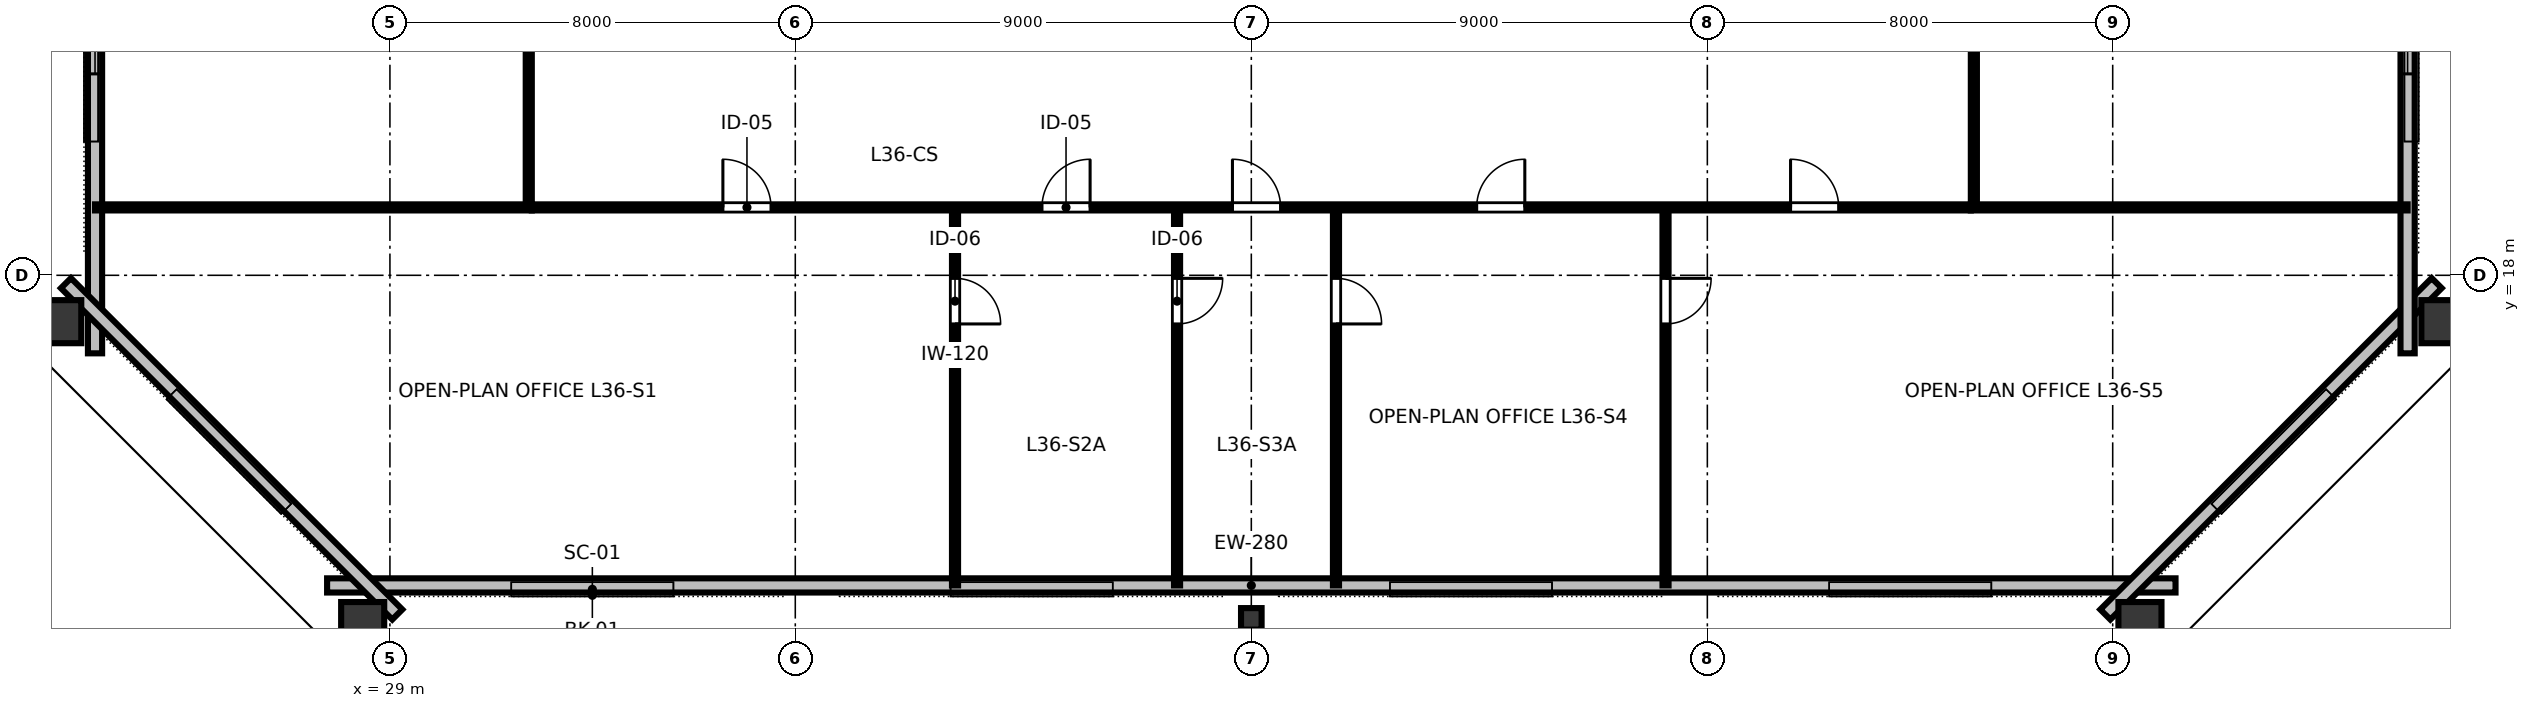
"""IFC4 building model, lengths in metres.
Left out: names, types, materials, properties, quantities, classifications, styles, units other than length and angle.
Written with IfcOpenShell. Run it as: python <this file> out.ifc"""

import sys

from ifc_helpers import new_model, si_unit, direction, frame, frame_2d, origin, origin_2d, place, context, subcontext, project, spatial, rectangle, hollow_rectangle, i_section, extrude, element, fill, save


model = new_model("IFC4")
c1 = context("Model", 3, precision=1e-05, world=origin(), true_north=direction((0.0, 1.0)))
c2 = subcontext(c1, "Body", "Model", "MODEL_VIEW")
j1 = project(units=[si_unit("LENGTHUNIT", "METRE"), si_unit("PLANEANGLEUNIT", "RADIAN")], contexts=[c1])
p1 = place(None, origin())
s1 = spatial("IfcSite", under=j1, at=p1, CompositionType="ELEMENT")
p2 = place(p1, origin())
s2 = spatial("IfcBuilding", under=s1, at=p2, CompositionType="ELEMENT")
p3 = place(p2, frame((0.0, 0.0, 138.4)))
s3 = spatial("IfcBuildingStorey", under=s2, at=p3, CompositionType="ELEMENT", Elevation=138.4)
p4 = place(p3, frame((28.462, 11.052, 0.0), z_axis=(0.0, 0.0, 1.0), x_axis=(1.0, 0.0, 0.0)))
e1 = element("IfcColumn", 1, at=p4, inside=s3, PredefinedType="COLUMN", context=c2, shape_type="SweptSolid", body=[
    extrude(hollow_rectangle(XDim=0.85, YDim=1.0, WallThickness=0.05, at=origin_2d()), origin(), (0.0, 0.0, 1.0), 3.358),
])
p5 = place(p3, frame((46.0, 11.22, 0.0), z_axis=(0.0, 0.0, 1.0), x_axis=(1.0, 0.0, 0.0)))
e2 = element("IfcColumn", 2, at=p5, inside=s3, PredefinedType="COLUMN", context=c2, shape_type="SweptSolid", body=[
    extrude(i_section(OverallWidth=0.406, OverallDepth=0.425, WebThickness=0.033, FlangeThickness=0.052, FilletRadius=0.025, at=origin_2d()), origin(), (0.0, 0.0, 1.0), 3.358),
])
for number, where, z_axis, x_axis in (
    (3, (63.538, 11.052, 0.0), (0.0, 0.0, 1.0), (1.0, 0.0, 0.0)),
    (4, (69.591, 17.085, 0.0), (0.0, 0.0, 1.0), (0.0, 1.0, 0.0)),
    (5, (22.409, 17.085, 0.0), (0.0, 0.0, 1.0), (0.0, 1.0, 0.0)),
):
    element("IfcColumn", number, at=place(p3, frame(where, z_axis=z_axis, x_axis=x_axis)), inside=s3, PredefinedType="COLUMN", context=c2, shape_type="SweptSolid", body=[
        extrude(hollow_rectangle(XDim=0.85, YDim=1.0, WallThickness=0.05, at=origin_2d()), origin(), (0.0, 0.0, 1.0), 3.358),
    ])
p6 = place(p3, frame((27.76, 11.88, 0.0), z_axis=(0.0, 0.0, 1.0), x_axis=(1.0, 0.0, 0.0)))
e6 = element("IfcWall", 6, at=p6, inside=s3, PredefinedType="STANDARD", context=c2, shape_type="SweptSolid", body=[
    extrude(rectangle(XDim=36.48, YDim=0.28, at=frame_2d((18.24, 0.0))), origin(), (0.0, 0.0, 1.0), 3.36),
])
p7 = place(p3, frame((62.854, 11.306, 0.0), z_axis=(0.0, 0.0, 1.0), x_axis=(0.707106781187, 0.707106781187, 0.0)))
e7 = element("IfcWall", 7, at=p7, inside=s3, PredefinedType="STANDARD", context=c2, shape_type="SweptSolid", body=[
    extrude(rectangle(XDim=9.248, YDim=0.28, at=frame_2d((4.624, 0.0))), origin(), (0.0, 0.0, 1.0), 3.36),
])
p8 = place(p3, frame((68.82, 16.46, 0.0), z_axis=(0.0, 0.0, 1.0), x_axis=(0.0, 1.0, 0.0)))
e8 = element("IfcWall", 8, at=p8, inside=s3, PredefinedType="STANDARD", context=c2, shape_type="SweptSolid", body=[
    extrude(rectangle(XDim=31.08, YDim=0.28, at=frame_2d((15.54, 0.0))), origin(), (0.0, 0.0, 1.0), 3.36),
])
p9 = place(p8, frame((11.86, 0.0, 0.0)))
e9 = element("IfcOpeningElement", 9, at=p9, cuts=e8, PredefinedType="OPENING", context=c2, shape_type="SweptSolid", body=[
    extrude(rectangle(XDim=1.4, YDim=2.15, at=frame_2d((0.7, 1.075))), frame((0.0, 0.15, 0.0), z_axis=(0.0, -1.0, 0.0), x_axis=(1.0, 0.0, 0.0)), (0.0, 0.0, 1.0), 0.3),
])
p10 = place(p8, frame((5.515, 0.0, 0.8)))
e10 = element("IfcOpeningElement", 10, at=p10, cuts=e8, PredefinedType="OPENING", context=c2, shape_type="SweptSolid", body=[
    extrude(rectangle(XDim=2.0, YDim=1.95, at=frame_2d((1.0, 0.975))), frame((0.0, 0.15, 0.0), z_axis=(0.0, -1.0, 0.0), x_axis=(1.0, 0.0, 0.0)), (0.0, 0.0, 1.0), 0.3),
])
p11 = place(p8, frame((9.125, 0.0, 0.8)))
e11 = element("IfcOpeningElement", 11, at=p11, cuts=e8, PredefinedType="OPENING", context=c2, shape_type="SweptSolid", body=[
    extrude(rectangle(XDim=2.0, YDim=1.95, at=frame_2d((1.0, 0.975))), frame((0.0, 0.15, 0.0), z_axis=(0.0, -1.0, 0.0), x_axis=(1.0, 0.0, 0.0)), (0.0, 0.0, 1.0), 0.3),
])
p12 = place(p8, frame((19.955, 0.0, 0.8)))
e12 = element("IfcOpeningElement", 12, at=p12, cuts=e8, PredefinedType="OPENING", context=c2, shape_type="SweptSolid", body=[
    extrude(rectangle(XDim=2.0, YDim=1.95, at=frame_2d((1.0, 0.975))), frame((0.0, 0.15, 0.0), z_axis=(0.0, -1.0, 0.0), x_axis=(1.0, 0.0, 0.0)), (0.0, 0.0, 1.0), 0.3),
])
p13 = place(p8, frame((23.565, 0.0, 0.8)))
e13 = element("IfcOpeningElement", 13, at=p13, cuts=e8, PredefinedType="OPENING", context=c2, shape_type="SweptSolid", body=[
    extrude(rectangle(XDim=2.0, YDim=1.95, at=frame_2d((1.0, 0.975))), frame((0.0, 0.15, 0.0), z_axis=(0.0, -1.0, 0.0), x_axis=(1.0, 0.0, 0.0)), (0.0, 0.0, 1.0), 0.3),
])
p14 = place(p3, frame((23.18, 47.54, 0.0), z_axis=(0.0, 0.0, 1.0), x_axis=(0.0, -1.0, 0.0)))
e14 = element("IfcWall", 14, at=p14, inside=s3, PredefinedType="STANDARD", context=c2, shape_type="SweptSolid", body=[
    extrude(rectangle(XDim=31.08, YDim=0.28, at=frame_2d((15.54, 0.0))), origin(), (0.0, 0.0, 1.0), 3.36),
])
p15 = place(p14, frame((11.86, 0.0, 0.0)))
e15 = element("IfcOpeningElement", 15, at=p15, cuts=e14, PredefinedType="OPENING", context=c2, shape_type="SweptSolid", body=[
    extrude(rectangle(XDim=1.4, YDim=2.15, at=frame_2d((0.7, 1.075))), frame((0.0, 0.15, 0.0), z_axis=(0.0, -1.0, 0.0), x_axis=(1.0, 0.0, 0.0)), (0.0, 0.0, 1.0), 0.3),
])
p16 = place(p14, frame((5.515, 0.0, 0.8)))
e16 = element("IfcOpeningElement", 16, at=p16, cuts=e14, PredefinedType="OPENING", context=c2, shape_type="SweptSolid", body=[
    extrude(rectangle(XDim=2.0, YDim=1.95, at=frame_2d((1.0, 0.975))), frame((0.0, 0.15, 0.0), z_axis=(0.0, -1.0, 0.0), x_axis=(1.0, 0.0, 0.0)), (0.0, 0.0, 1.0), 0.3),
])
p17 = place(p14, frame((9.125, 0.0, 0.8)))
e17 = element("IfcOpeningElement", 17, at=p17, cuts=e14, PredefinedType="OPENING", context=c2, shape_type="SweptSolid", body=[
    extrude(rectangle(XDim=2.0, YDim=1.95, at=frame_2d((1.0, 0.975))), frame((0.0, 0.15, 0.0), z_axis=(0.0, -1.0, 0.0), x_axis=(1.0, 0.0, 0.0)), (0.0, 0.0, 1.0), 0.3),
])
p18 = place(p14, frame((19.955, 0.0, 0.8)))
e18 = element("IfcOpeningElement", 18, at=p18, cuts=e14, PredefinedType="OPENING", context=c2, shape_type="SweptSolid", body=[
    extrude(rectangle(XDim=2.0, YDim=1.95, at=frame_2d((1.0, 0.975))), frame((0.0, 0.15, 0.0), z_axis=(0.0, -1.0, 0.0), x_axis=(1.0, 0.0, 0.0)), (0.0, 0.0, 1.0), 0.3),
])
p19 = place(p14, frame((23.565, 0.0, 0.8)))
e19 = element("IfcOpeningElement", 19, at=p19, cuts=e14, PredefinedType="OPENING", context=c2, shape_type="SweptSolid", body=[
    extrude(rectangle(XDim=2.0, YDim=1.95, at=frame_2d((1.0, 0.975))), frame((0.0, 0.15, 0.0), z_axis=(0.0, -1.0, 0.0), x_axis=(1.0, 0.0, 0.0)), (0.0, 0.0, 1.0), 0.3),
])
p20 = place(p3, frame((22.606, 17.845, 0.0), z_axis=(0.0, 0.0, 1.0), x_axis=(0.707106781187, -0.707106781187, 0.0)))
e20 = element("IfcWall", 20, at=p20, inside=s3, PredefinedType="STANDARD", context=c2, shape_type="SweptSolid", body=[
    extrude(rectangle(XDim=9.248, YDim=0.28, at=frame_2d((4.624, 0.0))), origin(), (0.0, 0.0, 1.0), 3.36),
])
p21 = place(p3, frame((40.152, 19.34, 0.0), z_axis=(0.0, 0.0, 1.0), x_axis=(0.0, -1.0, 0.0)))
e21 = element("IfcWall", 21, at=p21, inside=s3, PredefinedType="PARTITIONING", context=c2, shape_type="SweptSolid", body=[
    extrude(rectangle(XDim=7.46, YDim=0.12, at=frame_2d((3.73, 0.0))), origin(), (0.0, 0.0, 1.0), 2.64),
])
p22 = place(p21, frame((1.4, 0.0, 0.0)))
e22 = element("IfcOpeningElement", 22, at=p22, cuts=e21, PredefinedType="OPENING", context=c2, shape_type="SweptSolid", body=[
    extrude(rectangle(XDim=0.9, YDim=2.15, at=frame_2d((0.45, 1.075))), frame((0.0, 0.07, 0.0), z_axis=(0.0, -1.0, 0.0), x_axis=(1.0, 0.0, 0.0)), (0.0, 0.0, 1.0), 0.14),
])
p23 = place(p3, frame((44.534, 19.34, 0.0), z_axis=(0.0, 0.0, 1.0), x_axis=(0.0, -1.0, 0.0)))
e23 = element("IfcWall", 23, at=p23, inside=s3, PredefinedType="PARTITIONING", context=c2, shape_type="SweptSolid", body=[
    extrude(rectangle(XDim=7.46, YDim=0.12, at=frame_2d((3.73, 0.0))), origin(), (0.0, 0.0, 1.0), 2.64),
])
p24 = place(p23, frame((1.4, 0.0, 0.0)))
e24 = element("IfcOpeningElement", 24, at=p24, cuts=e23, PredefinedType="OPENING", context=c2, shape_type="SweptSolid", body=[
    extrude(rectangle(XDim=0.9, YDim=2.15, at=frame_2d((0.45, 1.075))), frame((0.0, 0.07, 0.0), z_axis=(0.0, -1.0, 0.0), x_axis=(1.0, 0.0, 0.0)), (0.0, 0.0, 1.0), 0.14),
])
p25 = place(p3, frame((47.671, 19.34, 0.0), z_axis=(0.0, 0.0, 1.0), x_axis=(0.0, -1.0, 0.0)))
e25 = element("IfcWall", 25, at=p25, inside=s3, PredefinedType="PARTITIONING", context=c2, shape_type="SweptSolid", body=[
    extrude(rectangle(XDim=7.46, YDim=0.12, at=frame_2d((3.73, 0.0))), origin(), (0.0, 0.0, 1.0), 2.64),
])
p26 = place(p25, frame((1.4, 0.0, 0.0)))
e26 = element("IfcOpeningElement", 26, at=p26, cuts=e25, PredefinedType="OPENING", context=c2, shape_type="SweptSolid", body=[
    extrude(rectangle(XDim=0.9, YDim=2.15, at=frame_2d((0.45, 1.075))), frame((0.0, 0.07, 0.0), z_axis=(0.0, -1.0, 0.0), x_axis=(1.0, 0.0, 0.0)), (0.0, 0.0, 1.0), 0.14),
])
p27 = place(p3, frame((54.175, 19.34, 0.0), z_axis=(0.0, 0.0, 1.0), x_axis=(0.0, -1.0, 0.0)))
e27 = element("IfcWall", 27, at=p27, inside=s3, PredefinedType="PARTITIONING", context=c2, shape_type="SweptSolid", body=[
    extrude(rectangle(XDim=7.46, YDim=0.12, at=frame_2d((3.73, 0.0))), origin(), (0.0, 0.0, 1.0), 2.64),
])
p28 = place(p27, frame((1.4, 0.0, 0.0)))
e28 = element("IfcOpeningElement", 28, at=p28, cuts=e27, PredefinedType="OPENING", context=c2, shape_type="SweptSolid", body=[
    extrude(rectangle(XDim=0.9, YDim=2.15, at=frame_2d((0.45, 1.075))), frame((0.0, 0.07, 0.0), z_axis=(0.0, -1.0, 0.0), x_axis=(1.0, 0.0, 0.0)), (0.0, 0.0, 1.0), 0.14),
])
p29 = place(p3, frame((31.8, 19.34, 0.0), z_axis=(0.0, 0.0, 1.0), x_axis=(1.0, 0.0, 0.0)))
e29 = element("IfcWall", 29, at=p29, inside=s3, PredefinedType="PARTITIONING", context=c2, shape_type="SweptSolid", body=[
    extrude(rectangle(XDim=28.4, YDim=0.12, at=frame_2d((14.2, 0.0))), origin(), (0.0, 0.0, 1.0), 2.64),
])
p30 = place(p29, frame((3.771, 0.0, 0.0)))
e30 = element("IfcOpeningElement", 30, at=p30, cuts=e29, PredefinedType="OPENING", context=c2, shape_type="SweptSolid", body=[
    extrude(rectangle(XDim=0.95, YDim=2.15, at=frame_2d((0.475, 1.075))), frame((0.0, 0.07, 0.0), z_axis=(0.0, -1.0, 0.0), x_axis=(1.0, 0.0, 0.0)), (0.0, 0.0, 1.0), 0.14),
])
p31 = place(p29, frame((10.068, 0.0, 0.0)))
e31 = element("IfcOpeningElement", 31, at=p31, cuts=e29, PredefinedType="OPENING", context=c2, shape_type="SweptSolid", body=[
    extrude(rectangle(XDim=0.95, YDim=2.15, at=frame_2d((0.475, 1.075))), frame((0.0, 0.07, 0.0), z_axis=(0.0, -1.0, 0.0), x_axis=(1.0, 0.0, 0.0)), (0.0, 0.0, 1.0), 0.14),
])
p32 = place(p29, frame((13.828, 0.0, 0.0)))
e32 = element("IfcOpeningElement", 32, at=p32, cuts=e29, PredefinedType="OPENING", context=c2, shape_type="SweptSolid", body=[
    extrude(rectangle(XDim=0.95, YDim=2.15, at=frame_2d((0.475, 1.075))), frame((0.0, 0.07, 0.0), z_axis=(0.0, -1.0, 0.0), x_axis=(1.0, 0.0, 0.0)), (0.0, 0.0, 1.0), 0.14),
])
p33 = place(p29, frame((18.648, 0.0, 0.0)))
e33 = element("IfcOpeningElement", 33, at=p33, cuts=e29, PredefinedType="OPENING", context=c2, shape_type="SweptSolid", body=[
    extrude(rectangle(XDim=0.95, YDim=2.15, at=frame_2d((0.475, 1.075))), frame((0.0, 0.07, 0.0), z_axis=(0.0, -1.0, 0.0), x_axis=(1.0, 0.0, 0.0)), (0.0, 0.0, 1.0), 0.14),
])
p34 = place(p29, frame((24.842, 0.0, 0.0)))
e34 = element("IfcOpeningElement", 34, at=p34, cuts=e29, PredefinedType="OPENING", context=c2, shape_type="SweptSolid", body=[
    extrude(rectangle(XDim=0.95, YDim=2.15, at=frame_2d((0.475, 1.075))), frame((0.0, 0.07, 0.0), z_axis=(0.0, -1.0, 0.0), x_axis=(1.0, 0.0, 0.0)), (0.0, 0.0, 1.0), 0.14),
])
p35 = place(p3, frame((31.74, 19.4, 0.0), z_axis=(0.0, 0.0, 1.0), x_axis=(0.0, 1.0, 0.0)))
e35 = element("IfcWall", 35, at=p35, inside=s3, PredefinedType="PARTITIONING", context=c2, shape_type="SweptSolid", body=[
    extrude(rectangle(XDim=11.58, YDim=0.12, at=frame_2d((5.79, 0.0))), origin(), (0.0, 0.0, 1.0), 2.64),
])
p36 = place(p35, frame((4.868, 0.0, 0.0)))
e36 = element("IfcOpeningElement", 36, at=p36, cuts=e35, PredefinedType="OPENING", context=c2, shape_type="SweptSolid", body=[
    extrude(rectangle(XDim=0.95, YDim=2.15, at=frame_2d((0.475, 1.075))), frame((0.0, 0.07, 0.0), z_axis=(0.0, -1.0, 0.0), x_axis=(1.0, 0.0, 0.0)), (0.0, 0.0, 1.0), 0.14),
])
p37 = place(p3, frame((60.26, 19.4, 0.0), z_axis=(0.0, 0.0, 1.0), x_axis=(0.0, 1.0, 0.0)))
e37 = element("IfcWall", 37, at=p37, inside=s3, PredefinedType="PARTITIONING", context=c2, shape_type="SweptSolid", body=[
    extrude(rectangle(XDim=11.58, YDim=0.12, at=frame_2d((5.79, 0.0))), origin(), (0.0, 0.0, 1.0), 2.64),
])
p38 = place(p37, frame((5.415, 0.0, 0.0)))
e38 = element("IfcOpeningElement", 38, at=p38, cuts=e37, PredefinedType="OPENING", context=c2, shape_type="SweptSolid", body=[
    extrude(rectangle(XDim=0.95, YDim=2.15, at=frame_2d((0.475, 1.075))), frame((0.0, 0.07, 0.0), z_axis=(0.0, -1.0, 0.0), x_axis=(1.0, 0.0, 0.0)), (0.0, 0.0, 1.0), 0.14),
])
for number, where, z_axis, x_axis in (
    (39, (31.8, 19.34, 0.0), (0.0, 0.0, 1.0), (-1.0, 0.0, 0.0)),
    (40, (60.2, 19.34, 0.0), (0.0, 0.0, 1.0), (1.0, 0.0, 0.0)),
):
    element("IfcWall", number, at=place(p3, frame(where, z_axis=z_axis, x_axis=x_axis)), inside=s3, PredefinedType="PARTITIONING", context=c2, shape_type="SweptSolid", body=[
        extrude(rectangle(XDim=8.62, YDim=0.12, at=frame_2d((4.31, 0.0))), origin(), (0.0, 0.0, 1.0), 2.64),
    ])
p39 = place(p10, origin())
e41 = element("IfcWindow", 41, at=p39, inside=s3, PartitioningType="SINGLE_PANEL", PredefinedType="WINDOW", context=c2, shape_type="SweptSolid", body=[
    extrude(rectangle(XDim=2.0, YDim=1.95, at=frame_2d((1.0, 0.975))), frame((0.0, 0.03, 0.0), z_axis=(0.0, -1.0, 0.0), x_axis=(1.0, 0.0, 0.0)), (0.0, 0.0, 1.0), 0.06),
])
fill(e10, e41)
p40 = place(p19, origin())
e42 = element("IfcWindow", 42, at=p40, inside=s3, PartitioningType="SINGLE_PANEL", PredefinedType="WINDOW", context=c2, shape_type="SweptSolid", body=[
    extrude(rectangle(XDim=2.0, YDim=1.95, at=frame_2d((1.0, 0.975))), frame((0.0, 0.03, 0.0), z_axis=(0.0, -1.0, 0.0), x_axis=(1.0, 0.0, 0.0)), (0.0, 0.0, 1.0), 0.06),
])
fill(e19, e42)
p41 = place(p22, origin())
e43 = element("IfcDoor", 43, at=p41, inside=s3, OperationType="SINGLE_SWING_RIGHT", PredefinedType="DOOR", context=c2, shape_type="SweptSolid", body=[
    extrude(rectangle(XDim=0.9, YDim=2.15, at=frame_2d((0.45, 1.075))), frame((0.0, 0.025, 0.0), z_axis=(0.0, -1.0, 0.0), x_axis=(1.0, 0.0, 0.0)), (0.0, 0.0, 1.0), 0.05),
])
fill(e22, e43)
p42 = place(p24, origin())
e44 = element("IfcDoor", 44, at=p42, inside=s3, OperationType="SINGLE_SWING_LEFT", PredefinedType="DOOR", context=c2, shape_type="SweptSolid", body=[
    extrude(rectangle(XDim=0.9, YDim=2.15, at=frame_2d((0.45, 1.075))), frame((0.0, 0.025, 0.0), z_axis=(0.0, -1.0, 0.0), x_axis=(1.0, 0.0, 0.0)), (0.0, 0.0, 1.0), 0.05),
])
fill(e24, e44)
p43 = place(p26, origin())
e45 = element("IfcDoor", 45, at=p43, inside=s3, OperationType="SINGLE_SWING_RIGHT", PredefinedType="DOOR", context=c2, shape_type="SweptSolid", body=[
    extrude(rectangle(XDim=0.9, YDim=2.15, at=frame_2d((0.45, 1.075))), frame((0.0, 0.025, 0.0), z_axis=(0.0, -1.0, 0.0), x_axis=(1.0, 0.0, 0.0)), (0.0, 0.0, 1.0), 0.05),
])
fill(e26, e45)
p44 = place(p28, origin())
e46 = element("IfcDoor", 46, at=p44, inside=s3, OperationType="SINGLE_SWING_LEFT", PredefinedType="DOOR", context=c2, shape_type="SweptSolid", body=[
    extrude(rectangle(XDim=0.9, YDim=2.15, at=frame_2d((0.45, 1.075))), frame((0.0, 0.025, 0.0), z_axis=(0.0, -1.0, 0.0), x_axis=(1.0, 0.0, 0.0)), (0.0, 0.0, 1.0), 0.05),
])
fill(e28, e46)
p45 = place(p30, origin())
e47 = element("IfcDoor", 47, at=p45, inside=s3, OperationType="SINGLE_SWING_LEFT", PredefinedType="DOOR", context=c2, shape_type="SweptSolid", body=[
    extrude(rectangle(XDim=0.95, YDim=2.15, at=frame_2d((0.475, 1.075))), frame((0.0, 0.025, 0.0), z_axis=(0.0, -1.0, 0.0), x_axis=(1.0, 0.0, 0.0)), (0.0, 0.0, 1.0), 0.05),
])
fill(e30, e47)
p46 = place(p31, origin())
e48 = element("IfcDoor", 48, at=p46, inside=s3, OperationType="SINGLE_SWING_RIGHT", PredefinedType="DOOR", context=c2, shape_type="SweptSolid", body=[
    extrude(rectangle(XDim=0.95, YDim=2.15, at=frame_2d((0.475, 1.075))), frame((0.0, 0.025, 0.0), z_axis=(0.0, -1.0, 0.0), x_axis=(1.0, 0.0, 0.0)), (0.0, 0.0, 1.0), 0.05),
])
fill(e31, e48)
p47 = place(p32, origin())
e49 = element("IfcDoor", 49, at=p47, inside=s3, OperationType="SINGLE_SWING_LEFT", PredefinedType="DOOR", context=c2, shape_type="SweptSolid", body=[
    extrude(rectangle(XDim=0.95, YDim=2.15, at=frame_2d((0.475, 1.075))), frame((0.0, 0.025, 0.0), z_axis=(0.0, -1.0, 0.0), x_axis=(1.0, 0.0, 0.0)), (0.0, 0.0, 1.0), 0.05),
])
fill(e32, e49)
p48 = place(p33, origin())
e50 = element("IfcDoor", 50, at=p48, inside=s3, OperationType="SINGLE_SWING_RIGHT", PredefinedType="DOOR", context=c2, shape_type="SweptSolid", body=[
    extrude(rectangle(XDim=0.95, YDim=2.15, at=frame_2d((0.475, 1.075))), frame((0.0, 0.025, 0.0), z_axis=(0.0, -1.0, 0.0), x_axis=(1.0, 0.0, 0.0)), (0.0, 0.0, 1.0), 0.05),
])
fill(e33, e50)
p49 = place(p34, origin())
e51 = element("IfcDoor", 51, at=p49, inside=s3, OperationType="SINGLE_SWING_LEFT", PredefinedType="DOOR", context=c2, shape_type="SweptSolid", body=[
    extrude(rectangle(XDim=0.95, YDim=2.15, at=frame_2d((0.475, 1.075))), frame((0.0, 0.025, 0.0), z_axis=(0.0, -1.0, 0.0), x_axis=(1.0, 0.0, 0.0)), (0.0, 0.0, 1.0), 0.05),
])
fill(e34, e51)
save(model, sys.argv[1])
